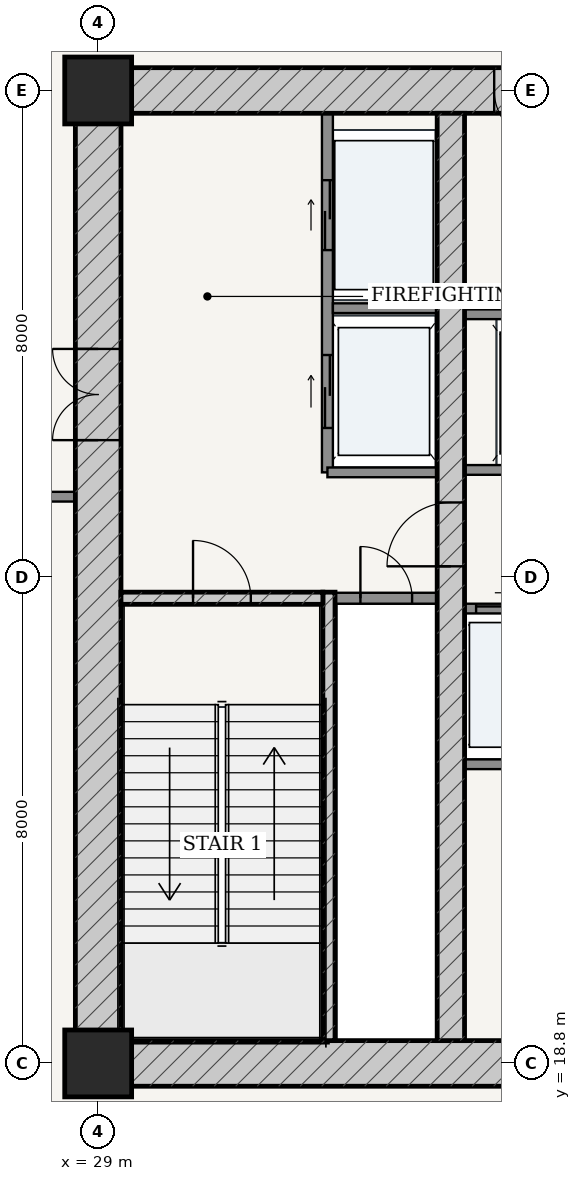
"""IFC4 building model, lengths in metres.
Left out: names, types, materials, properties, quantities, classifications, styles, units other than length and angle.
Written with IfcOpenShell. Run it as: python <this file> out.ifc"""

import sys

from ifc_helpers import new_model, si_unit, direction, frame, frame_2d, origin, origin_2d, place, context, subcontext, project, spatial, rectangle, extrude, source, transform, mapped, element, fill, save


model = new_model("IFC4")
c1 = context("Model", 3, precision=1e-05, world=origin(), true_north=direction((-0.2419218956, 0.970295726276)))
c2 = subcontext(c1, "Body", "Model", "MODEL_VIEW")
j1 = project(units=[si_unit("LENGTHUNIT", "METRE"), si_unit("PLANEANGLEUNIT", "RADIAN")], contexts=[c1])
p1 = place(None, origin())
s1 = spatial("IfcSite", under=j1, at=p1, CompositionType="ELEMENT")
p2 = place(p1, origin())
s2 = spatial("IfcBuilding", under=s1, at=p2, CompositionType="ELEMENT")
p3 = place(p2, origin())
s3 = spatial("IfcBuildingStorey", under=s2, at=p3, CompositionType="ELEMENT", Elevation=0.0)
for number, where, z_axis, x_axis in (
    (1, (29.0, 18.8, 0.0), (0.0, 0.0, 1.0), (1.0, 0.0, 0.0)),
    (2, (29.0, 34.8, 0.0), (0.0, 0.0, 1.0), (1.0, 0.0, 0.0)),
):
    element("IfcColumn", number, at=place(p3, frame(where, z_axis=z_axis, x_axis=x_axis)), inside=s3, PredefinedType="COLUMN", context=c2, shape_type="SweptSolid", body=[
        extrude(rectangle(XDim=1.1, YDim=1.1, at=origin_2d()), origin(), (0.0, 0.0, 1.0), 5.4),
    ])
p4 = place(p3, frame((28.625, 18.8, 0.0), z_axis=(0.0, 0.0, 1.0), x_axis=(1.0, 0.0, 0.0)))
e3 = element("IfcWall", 3, at=p4, inside=s3, PredefinedType="SHEAR", context=c2, shape_type="SweptSolid", body=[
    extrude(rectangle(XDim=18.75, YDim=0.75, at=frame_2d((9.375, 0.0))), origin(), (0.0, 0.0, 1.0), 5.1),
])
p5 = place(p4, frame((7.627, 0.0, 0.0)))
e4 = element("IfcOpeningElement", 4, at=p5, cuts=e3, PredefinedType="OPENING", context=c2, shape_type="SweptSolid", body=[
    extrude(rectangle(XDim=0.85, YDim=2.1, at=frame_2d((0.425, 1.05))), frame((0.0, 0.385, 0.0), z_axis=(0.0, -1.0, 0.0), x_axis=(1.0, 0.0, 0.0)), (0.0, 0.0, 1.0), 0.77),
])
p6 = place(p4, frame((10.673, 0.0, 0.0)))
e5 = element("IfcOpeningElement", 5, at=p6, cuts=e3, PredefinedType="OPENING", context=c2, shape_type="SweptSolid", body=[
    extrude(rectangle(XDim=0.85, YDim=2.1, at=frame_2d((0.425, 1.05))), frame((0.0, 0.385, 0.0), z_axis=(0.0, -1.0, 0.0), x_axis=(1.0, 0.0, 0.0)), (0.0, 0.0, 1.0), 0.77),
])
p7 = place(p3, frame((28.625, 34.8, 0.0), z_axis=(0.0, 0.0, 1.0), x_axis=(1.0, 0.0, 0.0)))
e6 = element("IfcWall", 6, at=p7, inside=s3, PredefinedType="SHEAR", context=c2, shape_type="SweptSolid", body=[
    extrude(rectangle(XDim=18.75, YDim=0.75, at=frame_2d((9.375, 0.0))), origin(), (0.0, 0.0, 1.0), 5.1),
])
p8 = place(p7, frame((6.887, 0.0, 0.0)))
e7 = element("IfcOpeningElement", 7, at=p8, cuts=e6, PredefinedType="OPENING", context=c2, shape_type="SweptSolid", body=[
    extrude(rectangle(XDim=0.85, YDim=2.1, at=frame_2d((0.425, 1.05))), frame((0.0, 0.385, 0.0), z_axis=(0.0, -1.0, 0.0), x_axis=(1.0, 0.0, 0.0)), (0.0, 0.0, 1.0), 0.77),
])
p9 = place(p7, frame((8.945, 0.0, 0.0)))
e8 = element("IfcOpeningElement", 8, at=p9, cuts=e6, PredefinedType="OPENING", context=c2, shape_type="SweptSolid", body=[
    extrude(rectangle(XDim=0.86, YDim=2.1, at=frame_2d((0.43, 1.05))), frame((0.0, 0.385, 0.0), z_axis=(0.0, -1.0, 0.0), x_axis=(1.0, 0.0, 0.0)), (0.0, 0.0, 1.0), 0.77),
])
p10 = place(p7, frame((11.012, 0.0, 0.0)))
e9 = element("IfcOpeningElement", 9, at=p10, cuts=e6, PredefinedType="OPENING", context=c2, shape_type="SweptSolid", body=[
    extrude(rectangle(XDim=0.85, YDim=2.1, at=frame_2d((0.425, 1.05))), frame((0.0, 0.385, 0.0), z_axis=(0.0, -1.0, 0.0), x_axis=(1.0, 0.0, 0.0)), (0.0, 0.0, 1.0), 0.77),
])
p11 = place(p3, frame((29.0, 19.175, 0.0), z_axis=(0.0, 0.0, 1.0), x_axis=(0.0, 1.0, 0.0)))
e10 = element("IfcWall", 10, at=p11, inside=s3, PredefinedType="SHEAR", context=c2, shape_type="SweptSolid", body=[
    extrude(rectangle(XDim=15.25, YDim=0.75, at=frame_2d((7.625, 0.0))), origin(), (0.0, 0.0, 1.0), 5.1),
])
p12 = place(p11, frame((9.875, 0.0, 0.0)))
e11 = element("IfcOpeningElement", 11, at=p12, cuts=e10, PredefinedType="OPENING", context=c2, shape_type="SweptSolid", body=[
    extrude(rectangle(XDim=1.5, YDim=2.2, at=frame_2d((0.75, 1.1))), frame((0.0, 0.385, 0.0), z_axis=(0.0, -1.0, 0.0), x_axis=(1.0, 0.0, 0.0)), (0.0, 0.0, 1.0), 0.77),
])
p13 = place(p3, frame((32.795, 19.175, 0.0), z_axis=(0.0, 0.0, 1.0), x_axis=(0.0, 1.0, 0.0)))
e12 = element("IfcWall", 12, at=p13, inside=s3, PredefinedType="SOLIDWALL", context=c2, shape_type="SweptSolid", body=[
    extrude(rectangle(XDim=7.375, YDim=0.2, at=frame_2d((3.688, 0.0))), origin(), (0.0, 0.0, 1.0), 5.1),
])
p14 = place(p3, frame((29.375, 26.45, 0.0), z_axis=(0.0, 0.0, 1.0), x_axis=(1.0, 0.0, 0.0)))
e13 = element("IfcWall", 13, at=p14, inside=s3, PredefinedType="SOLIDWALL", context=c2, shape_type="SweptSolid", body=[
    extrude(rectangle(XDim=3.32, YDim=0.2, at=frame_2d((1.66, 0.0))), origin(), (0.0, 0.0, 1.0), 5.1),
])
p15 = place(p14, frame((1.185, 0.0, 0.0)))
e14 = element("IfcOpeningElement", 14, at=p15, cuts=e13, PredefinedType="OPENING", context=c2, shape_type="SweptSolid", body=[
    extrude(rectangle(XDim=0.95, YDim=2.15, at=frame_2d((0.475, 1.075))), frame((0.0, 0.11, 0.0), z_axis=(0.0, -1.0, 0.0), x_axis=(1.0, 0.0, 0.0)), (0.0, 0.0, 1.0), 0.22),
])
p16 = place(p3, frame((34.8, 19.175, 0.0), z_axis=(0.0, 0.0, 1.0), x_axis=(0.0, 1.0, 0.0)))
e15 = element("IfcWall", 15, at=p16, inside=s3, PredefinedType="SHEAR", context=c2, shape_type="SweptSolid", body=[
    extrude(rectangle(XDim=15.25, YDim=0.45, at=frame_2d((7.625, 0.0))), origin(), (0.0, 0.0, 1.0), 5.1),
])
p17 = place(p16, frame((7.8, 0.0, 0.0)))
e16 = element("IfcOpeningElement", 16, at=p17, cuts=e15, PredefinedType="OPENING", context=c2, shape_type="SweptSolid", body=[
    extrude(rectangle(XDim=1.05, YDim=2.15, at=frame_2d((0.525, 1.075))), frame((0.0, 0.235, 0.0), z_axis=(0.0, -1.0, 0.0), x_axis=(1.0, 0.0, 0.0)), (0.0, 0.0, 1.0), 0.47),
])
p18 = place(p3, frame((32.9, 26.45, 0.0), z_axis=(0.0, 0.0, 1.0), x_axis=(1.0, 0.0, 0.0)))
e17 = element("IfcWall", 17, at=p18, inside=s3, PredefinedType="PARTITIONING", context=c2, shape_type="SweptSolid", body=[
    extrude(rectangle(XDim=1.675, YDim=0.18, at=frame_2d((0.837, 0.0))), origin(), (0.0, 0.0, 1.0), 5.1),
])
p19 = place(p18, frame((0.413, 0.0, 0.0)))
e18 = element("IfcOpeningElement", 18, at=p19, cuts=e17, PredefinedType="OPENING", context=c2, shape_type="SweptSolid", body=[
    extrude(rectangle(XDim=0.85, YDim=2.1, at=frame_2d((0.425, 1.05))), frame((0.0, 0.1, 0.0), z_axis=(0.0, -1.0, 0.0), x_axis=(1.0, 0.0, 0.0)), (0.0, 0.0, 1.0), 0.2),
])
p20 = place(p3, frame((32.77, 28.52, 0.0), z_axis=(0.0, 0.0, 1.0), x_axis=(0.0, 1.0, 0.0)))
e19 = element("IfcWall", 19, at=p20, inside=s3, PredefinedType="PARTITIONING", context=c2, shape_type="SweptSolid", body=[
    extrude(rectangle(XDim=5.905, YDim=0.18, at=frame_2d((2.953, 0.0))), origin(), (0.0, 0.0, 1.0), 5.1),
])
p21 = place(p20, frame((3.655, 0.0, 0.0)))
e20 = element("IfcOpeningElement", 20, at=p21, cuts=e19, PredefinedType="OPENING", context=c2, shape_type="SweptSolid", body=[
    extrude(rectangle(XDim=1.15, YDim=2.2, at=frame_2d((0.575, 1.1))), frame((0.0, 0.1, 0.0), z_axis=(0.0, -1.0, 0.0), x_axis=(1.0, 0.0, 0.0)), (0.0, 0.0, 1.0), 0.2),
])
p22 = place(p20, frame((0.73, 0.0, 0.0)))
e21 = element("IfcOpeningElement", 21, at=p22, cuts=e19, PredefinedType="OPENING", context=c2, shape_type="SweptSolid", body=[
    extrude(rectangle(XDim=1.2, YDim=2.25, at=frame_2d((0.6, 1.125))), frame((0.0, 0.1, 0.0), z_axis=(0.0, -1.0, 0.0), x_axis=(1.0, 0.0, 0.0)), (0.0, 0.0, 1.0), 0.2),
])
p23 = place(p3, frame((32.86, 31.22, 0.0), z_axis=(0.0, 0.0, 1.0), x_axis=(1.0, 0.0, 0.0)))
e22 = element("IfcWall", 22, at=p23, inside=s3, PredefinedType="PARTITIONING", context=c2, shape_type="SweptSolid", body=[
    extrude(rectangle(XDim=1.715, YDim=0.16, at=frame_2d((0.857, 0.0))), origin(), (0.0, 0.0, 1.0), 5.1),
])
p24 = place(p3, frame((32.77, 28.52, 0.0), z_axis=(0.0, 0.0, 1.0), x_axis=(1.0, 0.0, 0.0)))
e23 = element("IfcWall", 23, at=p24, inside=s3, PredefinedType="PARTITIONING", context=c2, shape_type="SweptSolid", body=[
    extrude(rectangle(XDim=1.805, YDim=0.16, at=frame_2d((0.902, 0.0))), origin(), (0.0, 0.0, 1.0), 5.1),
])
p25 = place(p3, frame((35.025, 28.56, 0.0), z_axis=(0.0, 0.0, 1.0), x_axis=(1.0, 0.0, 0.0)))
e24 = element("IfcWall", 24, at=p25, inside=s3, PredefinedType="PARTITIONING", context=c2, shape_type="SweptSolid", body=[
    extrude(rectangle(XDim=5.95, YDim=0.16, at=frame_2d((2.975, 0.0))), origin(), (0.0, 0.0, 1.0), 5.1),
])
p26 = place(p25, frame((0.76, 0.0, 0.0)))
e25 = element("IfcOpeningElement", 25, at=p26, cuts=e24, PredefinedType="OPENING", context=c2, shape_type="SweptSolid", body=[
    extrude(rectangle(XDim=1.1, YDim=2.2, at=frame_2d((0.55, 1.1))), frame((0.0, 0.09, 0.0), z_axis=(0.0, -1.0, 0.0), x_axis=(1.0, 0.0, 0.0)), (0.0, 0.0, 1.0), 0.18),
])
p27 = place(p25, frame((2.425, 0.0, 0.0)))
e26 = element("IfcOpeningElement", 26, at=p27, cuts=e24, PredefinedType="OPENING", context=c2, shape_type="SweptSolid", body=[
    extrude(rectangle(XDim=1.1, YDim=2.2, at=frame_2d((0.55, 1.1))), frame((0.0, 0.09, 0.0), z_axis=(0.0, -1.0, 0.0), x_axis=(1.0, 0.0, 0.0)), (0.0, 0.0, 1.0), 0.18),
])
p28 = place(p25, frame((4.09, 0.0, 0.0)))
e27 = element("IfcOpeningElement", 27, at=p28, cuts=e24, PredefinedType="OPENING", context=c2, shape_type="SweptSolid", body=[
    extrude(rectangle(XDim=1.1, YDim=2.2, at=frame_2d((0.55, 1.1))), frame((0.0, 0.09, 0.0), z_axis=(0.0, -1.0, 0.0), x_axis=(1.0, 0.0, 0.0)), (0.0, 0.0, 1.0), 0.18),
])
p29 = place(p3, frame((35.025, 31.12, 0.0), z_axis=(0.0, 0.0, 1.0), x_axis=(1.0, 0.0, 0.0)))
e28 = element("IfcWall", 28, at=p29, inside=s3, PredefinedType="PARTITIONING", context=c2, shape_type="SweptSolid", body=[
    extrude(rectangle(XDim=5.95, YDim=0.16, at=frame_2d((2.975, 0.0))), origin(), (0.0, 0.0, 1.0), 5.1),
])
p30 = place(p3, frame((35.025, 26.28, 0.0), z_axis=(0.0, 0.0, 1.0), x_axis=(1.0, 0.0, 0.0)))
e29 = element("IfcWall", 29, at=p30, inside=s3, PredefinedType="PARTITIONING", context=c2, shape_type="SweptSolid", body=[
    extrude(rectangle(XDim=5.95, YDim=0.16, at=frame_2d((2.975, 0.0))), origin(), (0.0, 0.0, 1.0), 5.1),
])
p31 = place(p30, frame((0.19, 0.0, 0.0)))
e30 = element("IfcOpeningElement", 30, at=p31, cuts=e29, PredefinedType="OPENING", context=c2, shape_type="SweptSolid", body=[
    extrude(rectangle(XDim=1.1, YDim=2.2, at=frame_2d((0.55, 1.1))), frame((0.0, 0.09, 0.0), z_axis=(0.0, -1.0, 0.0), x_axis=(1.0, 0.0, 0.0)), (0.0, 0.0, 1.0), 0.18),
])
p32 = place(p30, frame((1.67, 0.0, 0.0)))
e31 = element("IfcOpeningElement", 31, at=p32, cuts=e29, PredefinedType="OPENING", context=c2, shape_type="SweptSolid", body=[
    extrude(rectangle(XDim=1.1, YDim=2.2, at=frame_2d((0.55, 1.1))), frame((0.0, 0.09, 0.0), z_axis=(0.0, -1.0, 0.0), x_axis=(1.0, 0.0, 0.0)), (0.0, 0.0, 1.0), 0.18),
])
p33 = place(p30, frame((3.18, 0.0, 0.0)))
e32 = element("IfcOpeningElement", 32, at=p33, cuts=e29, PredefinedType="OPENING", context=c2, shape_type="SweptSolid", body=[
    extrude(rectangle(XDim=1.1, YDim=2.2, at=frame_2d((0.55, 1.1))), frame((0.0, 0.09, 0.0), z_axis=(0.0, -1.0, 0.0), x_axis=(1.0, 0.0, 0.0)), (0.0, 0.0, 1.0), 0.18),
])
p34 = place(p30, frame((4.66, 0.0, 0.0)))
e33 = element("IfcOpeningElement", 33, at=p34, cuts=e29, PredefinedType="OPENING", context=c2, shape_type="SweptSolid", body=[
    extrude(rectangle(XDim=1.1, YDim=2.2, at=frame_2d((0.55, 1.1))), frame((0.0, 0.09, 0.0), z_axis=(0.0, -1.0, 0.0), x_axis=(1.0, 0.0, 0.0)), (0.0, 0.0, 1.0), 0.18),
])
p35 = place(p3, frame((35.025, 23.72, 0.0), z_axis=(0.0, 0.0, 1.0), x_axis=(1.0, 0.0, 0.0)))
e34 = element("IfcWall", 34, at=p35, inside=s3, PredefinedType="PARTITIONING", context=c2, shape_type="SweptSolid", body=[
    extrude(rectangle(XDim=5.95, YDim=0.16, at=frame_2d((2.975, 0.0))), origin(), (0.0, 0.0, 1.0), 5.1),
])
p36 = place(p3, frame((26.12, 28.12, 0.0), z_axis=(0.0, 0.0, 1.0), x_axis=(1.0, 0.0, 0.0)))
e35 = element("IfcWall", 35, at=p36, inside=s3, PredefinedType="PARTITIONING", context=c2, shape_type="SweptSolid", body=[
    extrude(rectangle(XDim=2.505, YDim=0.16, at=frame_2d((1.252, 0.0))), origin(), (0.0, 0.0, 1.0), 4.45),
])
m1 = source(origin(), c2, "Body", "SweptSolid", [
    extrude(rectangle(XDim=1.5, YDim=2.2, at=frame_2d((0.75, 1.1))), frame((0.0, 0.025, 0.0), z_axis=(0.0, -1.0, 0.0), x_axis=(1.0, 0.0, 0.0)), (0.0, 0.0, 1.0), 0.05),
])
p37 = place(p12, origin())
e36 = element("IfcDoor", 36, at=p37, inside=s3, OperationType="DOUBLE_DOOR_SINGLE_SWING", PredefinedType="DOOR", context=c2, shape_type="MappedRepresentation", body=[
    mapped(m1, transform((0.0, 0.0, 0.0), scale=1.0)),
])
fill(e11, e36)
m2 = source(origin(), c2, "Body", "SweptSolid", [
    extrude(rectangle(XDim=1.05, YDim=2.15, at=frame_2d((0.525, 1.075))), frame((0.0, 0.025, 0.0), z_axis=(0.0, -1.0, 0.0), x_axis=(1.0, 0.0, 0.0)), (0.0, 0.0, 1.0), 0.05),
])
p38 = place(p17, origin())
e37 = element("IfcDoor", 37, at=p38, inside=s3, OperationType="SINGLE_SWING_LEFT", PredefinedType="DOOR", context=c2, shape_type="MappedRepresentation", body=[
    mapped(m2, transform((0.0, 0.0, 0.0), scale=1.0)),
])
fill(e16, e37)
m3 = source(origin(), c2, "Body", "SweptSolid", [
    extrude(rectangle(XDim=0.95, YDim=2.15, at=frame_2d((0.475, 1.075))), frame((0.0, 0.025, 0.0), z_axis=(0.0, -1.0, 0.0), x_axis=(1.0, 0.0, 0.0)), (0.0, 0.0, 1.0), 0.05),
])
p39 = place(p15, origin())
e38 = element("IfcDoor", 38, at=p39, inside=s3, OperationType="SINGLE_SWING_LEFT", PredefinedType="DOOR", context=c2, shape_type="MappedRepresentation", body=[
    mapped(m3, transform((0.0, 0.0, 0.0), scale=1.0)),
])
fill(e14, e38)
m4 = source(origin(), c2, "Body", "SweptSolid", [
    extrude(rectangle(XDim=0.85, YDim=2.1, at=frame_2d((0.425, 1.05))), frame((0.0, 0.025, 0.0), z_axis=(0.0, -1.0, 0.0), x_axis=(1.0, 0.0, 0.0)), (0.0, 0.0, 1.0), 0.05),
])
p40 = place(p19, origin())
e39 = element("IfcDoor", 39, at=p40, inside=s3, OperationType="SINGLE_SWING_LEFT", PredefinedType="DOOR", context=c2, shape_type="MappedRepresentation", body=[
    mapped(m4, transform((0.0, 0.0, 0.0), scale=1.0)),
])
fill(e18, e39)
p41 = place(p8, frame((0.85, 0.0, 0.0), z_axis=(0.0, 0.0, 1.0), x_axis=(-1.0, 0.0, 0.0)))
e40 = element("IfcDoor", 40, at=p41, inside=s3, OperationType="SINGLE_SWING_LEFT", PredefinedType="DOOR", context=c2, shape_type="MappedRepresentation", body=[
    mapped(m4, transform((0.0, 0.0, 0.0), scale=1.0)),
])
fill(e7, e40)
m5 = source(origin(), c2, "Body", "SweptSolid", [
    extrude(rectangle(XDim=1.15, YDim=2.2, at=frame_2d((0.575, 1.1))), frame((0.0, 0.025, 0.0), z_axis=(0.0, -1.0, 0.0), x_axis=(1.0, 0.0, 0.0)), (0.0, 0.0, 1.0), 0.05),
])
p42 = place(p21, origin())
e41 = element("IfcDoor", 41, at=p42, inside=s3, OperationType="DOUBLE_DOOR_SLIDING", PredefinedType="DOOR", context=c2, shape_type="MappedRepresentation", body=[
    mapped(m5, transform((0.0, 0.0, 0.0), scale=1.0)),
])
fill(e20, e41)
m6 = source(origin(), c2, "Body", "SweptSolid", [
    extrude(rectangle(XDim=1.2, YDim=2.25, at=frame_2d((0.6, 1.125))), frame((0.0, 0.025, 0.0), z_axis=(0.0, -1.0, 0.0), x_axis=(1.0, 0.0, 0.0)), (0.0, 0.0, 1.0), 0.05),
])
p43 = place(p22, origin())
e42 = element("IfcDoor", 42, at=p43, inside=s3, OperationType="DOUBLE_DOOR_SLIDING", PredefinedType="DOOR", context=c2, shape_type="MappedRepresentation", body=[
    mapped(m6, transform((0.0, 0.0, 0.0), scale=1.0)),
])
fill(e21, e42)
m7 = source(origin(), c2, "Body", "SweptSolid", [
    extrude(rectangle(XDim=1.1, YDim=2.2, at=frame_2d((0.55, 1.1))), frame((0.0, 0.025, 0.0), z_axis=(0.0, -1.0, 0.0), x_axis=(1.0, 0.0, 0.0)), (0.0, 0.0, 1.0), 0.05),
])
p44 = place(p31, origin())
e43 = element("IfcDoor", 43, at=p44, inside=s3, OperationType="DOUBLE_DOOR_SLIDING", PredefinedType="DOOR", context=c2, shape_type="MappedRepresentation", body=[
    mapped(m7, transform((0.0, 0.0, 0.0), scale=1.0)),
])
fill(e30, e43)
save(model, sys.argv[1])
